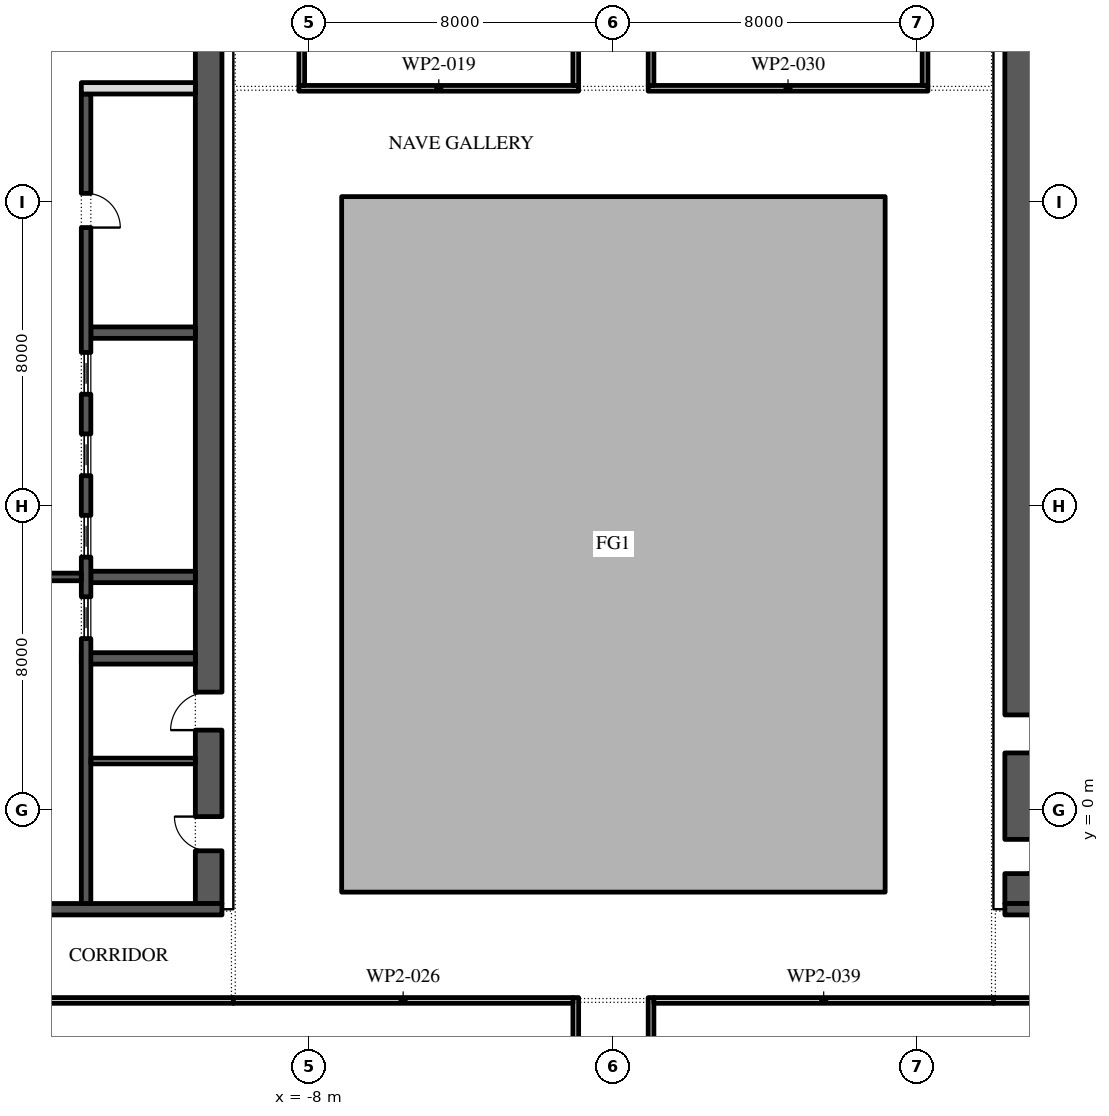
"""IFC4 building model, lengths in metres.
Left out: names, types, materials, properties, quantities, classifications, styles, units other than length and angle.
Written with IfcOpenShell. Run it as: python <this file> out.ifc"""

import sys

from ifc_helpers import new_model, si_unit, direction, frame, frame_2d, origin, place, context, subcontext, project, spatial, polyline, rectangle, outline, extrude, element, fill, save


model = new_model("IFC4")
c1 = context("Model", 3, precision=1e-05, world=origin(), true_north=direction((0.0, 1.0)))
c2 = subcontext(c1, "Body", "Model", "MODEL_VIEW")
j1 = project(units=[si_unit("LENGTHUNIT", "METRE"), si_unit("PLANEANGLEUNIT", "RADIAN")], contexts=[c1])
p1 = place(None, origin())
s1 = spatial("IfcSite", under=j1, at=p1, CompositionType="ELEMENT")
p2 = place(p1, origin())
s2 = spatial("IfcBuilding", under=s1, at=p2, CompositionType="ELEMENT")
p3 = place(p2, frame((0.0, 0.0, 201.0)))
s3 = spatial("IfcBuildingStorey", under=s2, at=p3, CompositionType="ELEMENT", Elevation=201.0)
p4 = place(p3, origin())
e1 = element("IfcWall", 1, at=p4, inside=s3, PredefinedType="STANDARD", context=c2, shape_type="SweptSolid", body=[
    extrude(outline(polyline([(-7.15, -2.15), (7.15, -2.15), (7.15, 16.15), (-7.15, 16.15), (-7.15, -2.15)]), holes=[polyline([(-7.0, -2.0), (-7.0, 16.0), (7.0, 16.0), (7.0, -2.0), (-7.0, -2.0)])]), origin(), (0.0, 0.0, 1.0), 4.0),
])
p5 = place(p3, frame((-10.65, -2.45, 0.0), z_axis=(0.0, 0.0, 1.0), x_axis=(0.0, 1.0, 0.0)))
e2 = element("IfcWall", 2, at=p5, inside=s3, PredefinedType="SHEAR", context=c2, shape_type="SweptSolid", body=[
    extrude(rectangle(XDim=27.9, YDim=0.7, at=frame_2d((13.95, 0.0))), origin(), (0.0, 0.0, 1.0), 4.0),
])
p6 = place(p5, frame((23.65, 0.0, 0.0)))
e3 = element("IfcOpeningElement", 3, at=p6, cuts=e2, PredefinedType="OPENING", context=c2, shape_type="SweptSolid", body=[
    extrude(rectangle(XDim=2.4, YDim=2.1, at=frame_2d((1.2, 1.05))), frame((0.0, 0.36, 0.0), z_axis=(0.0, -1.0, 0.0), x_axis=(1.0, 0.0, 0.0)), (0.0, 0.0, 1.0), 0.72),
])
p7 = place(p5, frame((1.387, 0.0, 0.0)))
e4 = element("IfcOpeningElement", 4, at=p7, cuts=e2, PredefinedType="OPENING", context=c2, shape_type="SweptSolid", body=[
    extrude(rectangle(XDim=0.9, YDim=2.1, at=frame_2d((0.45, 1.05))), frame((0.0, 0.36, 0.0), z_axis=(0.0, -1.0, 0.0), x_axis=(1.0, 0.0, 0.0)), (0.0, 0.0, 1.0), 0.72),
])
p8 = place(p5, frame((4.562, 0.0, 0.0)))
e5 = element("IfcOpeningElement", 5, at=p8, cuts=e2, PredefinedType="OPENING", context=c2, shape_type="SweptSolid", body=[
    extrude(rectangle(XDim=1.0, YDim=2.1, at=frame_2d((0.5, 1.05))), frame((0.0, 0.36, 0.0), z_axis=(0.0, -1.0, 0.0), x_axis=(1.0, 0.0, 0.0)), (0.0, 0.0, 1.0), 0.72),
])
p9 = place(p3, frame((-21.7, -2.6, 0.0), z_axis=(0.0, 0.0, 1.0), x_axis=(1.0, 0.0, 0.0)))
e6 = element("IfcWall", 6, at=p9, inside=s3, PredefinedType="SHEAR", context=c2, shape_type="SweptSolid", body=[
    extrude(rectangle(XDim=11.4, YDim=0.3, at=frame_2d((5.7, 0.0))), origin(), (0.0, 0.0, 1.0), 4.0),
])
p10 = place(p3, frame((-14.0, 4.0, 0.0), z_axis=(0.0, 0.0, 1.0), x_axis=(1.0, 0.0, 0.0)))
e7 = element("IfcWall", 7, at=p10, inside=s3, PredefinedType="SHEAR", context=c2, shape_type="SweptSolid", body=[
    extrude(rectangle(XDim=3.0, YDim=0.3, at=frame_2d((1.5, 0.0))), origin(), (0.0, 0.0, 1.0), 4.0),
])
for number, where, z_axis, x_axis in (
    (8, (-13.75, 6.143, 0.0), (0.0, 0.0, 1.0), (1.0, 0.0, 0.0)),
    (9, (-13.75, 12.571, 0.0), (0.0, 0.0, 1.0), (1.0, 0.0, 0.0)),
):
    element("IfcWall", number, at=place(p3, frame(where, z_axis=z_axis, x_axis=x_axis)), inside=s3, PredefinedType="SHEAR", context=c2, shape_type="SweptSolid", body=[
        extrude(rectangle(XDim=2.75, YDim=0.3, at=frame_2d((1.375, 0.0))), origin(), (0.0, 0.0, 1.0), 4.0),
    ])
p11 = place(p3, frame((-13.875, -2.45, 0.0), z_axis=(0.0, 0.0, 1.0), x_axis=(0.0, 1.0, 0.0)))
e10 = element("IfcWall", 10, at=p11, inside=s3, PredefinedType="SHEAR", context=c2, shape_type="SweptSolid", body=[
    extrude(rectangle(XDim=21.3, YDim=0.25, at=frame_2d((10.65, 0.0))), origin(), (0.0, 0.0, 1.0), 4.0),
])
p12 = place(p11, frame((17.786, 0.0, 0.0)))
e11 = element("IfcOpeningElement", 11, at=p12, cuts=e10, PredefinedType="OPENING", context=c2, shape_type="SweptSolid", body=[
    extrude(rectangle(XDim=0.9, YDim=2.1, at=frame_2d((0.45, 1.05))), frame((0.0, 0.135, 0.0), z_axis=(0.0, -1.0, 0.0), x_axis=(1.0, 0.0, 0.0)), (0.0, 0.0, 1.0), 0.27),
])
p13 = place(p11, frame((6.971, 0.0, 0.0)))
e12 = element("IfcOpeningElement", 12, at=p13, cuts=e10, PredefinedType="OPENING", context=c2, shape_type="SweptSolid", body=[
    extrude(rectangle(XDim=1.1, YDim=2.1, at=frame_2d((0.55, 1.05))), frame((0.0, 0.135, 0.0), z_axis=(0.0, -1.0, 0.0), x_axis=(1.0, 0.0, 0.0)), (0.0, 0.0, 1.0), 0.27),
])
p14 = place(p11, frame((9.114, 0.0, 0.0)))
e13 = element("IfcOpeningElement", 13, at=p14, cuts=e10, PredefinedType="OPENING", context=c2, shape_type="SweptSolid", body=[
    extrude(rectangle(XDim=1.1, YDim=2.1, at=frame_2d((0.55, 1.05))), frame((0.0, 0.135, 0.0), z_axis=(0.0, -1.0, 0.0), x_axis=(1.0, 0.0, 0.0)), (0.0, 0.0, 1.0), 0.27),
])
p15 = place(p11, frame((11.257, 0.0, 0.0)))
e14 = element("IfcOpeningElement", 14, at=p15, cuts=e10, PredefinedType="OPENING", context=c2, shape_type="SweptSolid", body=[
    extrude(rectangle(XDim=1.1, YDim=2.1, at=frame_2d((0.55, 1.05))), frame((0.0, 0.135, 0.0), z_axis=(0.0, -1.0, 0.0), x_axis=(1.0, 0.0, 0.0)), (0.0, 0.0, 1.0), 0.27),
])
p16 = place(p11, frame((13.4, 0.0, 0.0)))
e15 = element("IfcOpeningElement", 15, at=p16, cuts=e10, PredefinedType="OPENING", context=c2, shape_type="SweptSolid", body=[
    extrude(rectangle(XDim=1.1, YDim=2.1, at=frame_2d((0.55, 1.05))), frame((0.0, 0.135, 0.0), z_axis=(0.0, -1.0, 0.0), x_axis=(1.0, 0.0, 0.0)), (0.0, 0.0, 1.0), 0.27),
])
p17 = place(p3, frame((-14.0, 19.0, 0.0), z_axis=(0.0, 0.0, 1.0), x_axis=(1.0, 0.0, 0.0)))
e16 = element("IfcWall", 16, at=p17, inside=s3, PredefinedType="PARTITIONING", context=c2, shape_type="SweptSolid", body=[
    extrude(rectangle(XDim=3.0, YDim=0.3, at=frame_2d((1.5, 0.0))), origin(), (0.0, 0.0, 1.0), 4.0),
])
p18 = place(p3, frame((-18.0, 6.143, 0.0), z_axis=(0.0, 0.0, 1.0), x_axis=(1.0, 0.0, 0.0)))
e17 = element("IfcWall", 17, at=p18, inside=s3, PredefinedType="SHEAR", context=c2, shape_type="SweptSolid", body=[
    extrude(rectangle(XDim=4.0, YDim=0.2, at=frame_2d((2.0, 0.0))), origin(), (0.0, 0.0, 1.0), 4.0),
])
p19 = place(p18, frame((1.4, 0.0, 0.0)))
e18 = element("IfcOpeningElement", 18, at=p19, cuts=e17, PredefinedType="OPENING", context=c2, shape_type="SweptSolid", body=[
    extrude(rectangle(XDim=1.2, YDim=2.1, at=frame_2d((0.6, 1.05))), frame((0.0, 0.11, 0.0), z_axis=(0.0, -1.0, 0.0), x_axis=(1.0, 0.0, 0.0)), (0.0, 0.0, 1.0), 0.22),
])
p20 = place(p3, frame((-13.75, 1.3, 0.0), z_axis=(0.0, 0.0, 1.0), x_axis=(1.0, 0.0, 0.0)))
e19 = element("IfcWall", 19, at=p20, inside=s3, PredefinedType="PARTITIONING", context=c2, shape_type="SweptSolid", body=[
    extrude(rectangle(XDim=2.75, YDim=0.15, at=frame_2d((1.375, 0.0))), origin(), (0.0, 0.0, 1.0), 4.0),
])
p21 = place(p3, frame((10.65, -2.45, 0.0), z_axis=(0.0, 0.0, 1.0), x_axis=(0.0, 1.0, 0.0)))
e20 = element("IfcWall", 20, at=p21, inside=s3, PredefinedType="SHEAR", context=c2, shape_type="SweptSolid", body=[
    extrude(rectangle(XDim=27.9, YDim=0.7, at=frame_2d((13.95, 0.0))), origin(), (0.0, 0.0, 1.0), 4.0),
])
p22 = place(p21, frame((23.65, 0.0, 0.0)))
e21 = element("IfcOpeningElement", 21, at=p22, cuts=e20, PredefinedType="OPENING", context=c2, shape_type="SweptSolid", body=[
    extrude(rectangle(XDim=2.4, YDim=2.1, at=frame_2d((1.2, 1.05))), frame((0.0, 0.36, 0.0), z_axis=(0.0, -1.0, 0.0), x_axis=(1.0, 0.0, 0.0)), (0.0, 0.0, 1.0), 0.72),
])
p23 = place(p21, frame((0.788, 0.0, 0.0)))
e22 = element("IfcOpeningElement", 22, at=p23, cuts=e20, PredefinedType="OPENING", context=c2, shape_type="SweptSolid", body=[
    extrude(rectangle(XDim=0.9, YDim=2.1, at=frame_2d((0.45, 1.05))), frame((0.0, 0.36, 0.0), z_axis=(0.0, -1.0, 0.0), x_axis=(1.0, 0.0, 0.0)), (0.0, 0.0, 1.0), 0.72),
])
p24 = place(p21, frame((3.962, 0.0, 0.0)))
e23 = element("IfcOpeningElement", 23, at=p24, cuts=e20, PredefinedType="OPENING", context=c2, shape_type="SweptSolid", body=[
    extrude(rectangle(XDim=1.0, YDim=2.1, at=frame_2d((0.5, 1.05))), frame((0.0, 0.36, 0.0), z_axis=(0.0, -1.0, 0.0), x_axis=(1.0, 0.0, 0.0)), (0.0, 0.0, 1.0), 0.72),
])
p25 = place(p3, frame((10.3, -2.6, 0.0), z_axis=(0.0, 0.0, 1.0), x_axis=(1.0, 0.0, 0.0)))
e24 = element("IfcWall", 24, at=p25, inside=s3, PredefinedType="SHEAR", context=c2, shape_type="SweptSolid", body=[
    extrude(rectangle(XDim=11.4, YDim=0.3, at=frame_2d((5.7, 0.0))), origin(), (0.0, 0.0, 1.0), 4.0),
])
p26 = place(p3, frame((-10.0, -5.0, 0.0), z_axis=(0.0, 0.0, 1.0), x_axis=(-1.0, 0.0, 0.0)))
e25 = element("IfcWall", 25, at=p26, inside=s3, PredefinedType="PARTITIONING", context=c2, shape_type="SweptSolid", body=[
    extrude(rectangle(XDim=12.47, YDim=0.15, at=frame_2d((6.235, 0.0))), origin(), (0.0, 0.0, 1.0), 4.0),
])
p27 = place(p26, frame((8.37, 0.0, 0.0)))
e26 = element("IfcOpeningElement", 26, at=p27, cuts=e25, PredefinedType="OPENING", context=c2, shape_type="SweptSolid", body=[
    extrude(rectangle(XDim=1.0, YDim=2.1, at=frame_2d((0.5, 1.05))), frame((0.0, 0.085, 0.0), z_axis=(0.0, -1.0, 0.0), x_axis=(1.0, 0.0, 0.0)), (0.0, 0.0, 1.0), 0.17),
])
p28 = place(p3, frame((-8.275, 19.0, 0.0), z_axis=(0.0, 0.0, 1.0), x_axis=(1.0, 0.0, 0.0)))
e27 = element("IfcWall", 27, at=p28, inside=s3, PredefinedType="PARTITIONING", context=c2, shape_type="SweptSolid", body=[
    extrude(rectangle(XDim=7.36, YDim=0.15, at=frame_2d((3.68, 0.0))), origin(), (0.0, 0.0, 1.0), 4.0),
])
p29 = place(p3, frame((-8.2, 27.2, 0.0), z_axis=(0.0, 0.0, 1.0), x_axis=(0.0, -1.0, 0.0)))
e28 = element("IfcWall", 28, at=p29, inside=s3, PredefinedType="PARTITIONING", context=c2, shape_type="SweptSolid", body=[
    extrude(rectangle(XDim=8.125, YDim=0.15, at=frame_2d((4.062, 0.0))), origin(), (0.0, 0.0, 1.0), 4.0),
])
p30 = place(p3, frame((-0.99, -10.45, 0.0), z_axis=(0.0, 0.0, 1.0), x_axis=(0.0, 1.0, 0.0)))
e29 = element("IfcWall", 29, at=p30, inside=s3, PredefinedType="PARTITIONING", context=c2, shape_type="SweptSolid", body=[
    extrude(rectangle(XDim=5.525, YDim=0.15, at=frame_2d((2.762, 0.0))), origin(), (0.0, 0.0, 1.0), 4.0),
])
p31 = place(p3, frame((-1.065, -5.0, 0.0), z_axis=(0.0, 0.0, 1.0), x_axis=(-1.0, 0.0, 0.0)))
e30 = element("IfcWall", 30, at=p31, inside=s3, PredefinedType="PARTITIONING", context=c2, shape_type="SweptSolid", body=[
    extrude(rectangle(XDim=8.935, YDim=0.15, at=frame_2d((4.468, 0.0))), origin(), (0.0, 0.0, 1.0), 4.0),
])
p32 = place(p3, frame((-0.99, 19.075, 0.0), z_axis=(0.0, 0.0, 1.0), x_axis=(0.0, 1.0, 0.0)))
e31 = element("IfcWall", 31, at=p32, inside=s3, PredefinedType="PARTITIONING", context=c2, shape_type="SweptSolid", body=[
    extrude(rectangle(XDim=10.375, YDim=0.15, at=frame_2d((5.188, 0.0))), origin(), (0.0, 0.0, 1.0), 4.0),
])
p33 = place(p32, frame((6.775, 0.0, 0.0)))
e32 = element("IfcOpeningElement", 32, at=p33, cuts=e31, PredefinedType="OPENING", context=c2, shape_type="SweptSolid", body=[
    extrude(rectangle(XDim=1.0, YDim=2.1, at=frame_2d((0.5, 1.05))), frame((0.0, 0.085, 0.0), z_axis=(0.0, -1.0, 0.0), x_axis=(1.0, 0.0, 0.0)), (0.0, 0.0, 1.0), 0.17),
])
p34 = place(p3, frame((0.99, -4.925, 0.0), z_axis=(0.0, 0.0, 1.0), x_axis=(0.0, -1.0, 0.0)))
e33 = element("IfcWall", 33, at=p34, inside=s3, PredefinedType="PARTITIONING", context=c2, shape_type="SweptSolid", body=[
    extrude(rectangle(XDim=11.371, YDim=0.15, at=frame_2d((5.686, 0.0))), origin(), (0.0, 0.0, 1.0), 4.0),
])
p35 = place(p34, frame((2.945, 0.0, 0.0)))
e34 = element("IfcOpeningElement", 34, at=p35, cuts=e33, PredefinedType="OPENING", context=c2, shape_type="SweptSolid", body=[
    extrude(rectangle(XDim=1.0, YDim=2.1, at=frame_2d((0.5, 1.05))), frame((0.0, 0.085, 0.0), z_axis=(0.0, -1.0, 0.0), x_axis=(1.0, 0.0, 0.0)), (0.0, 0.0, 1.0), 0.17),
])
p36 = place(p3, frame((0.915, 19.0, 0.0), z_axis=(0.0, 0.0, 1.0), x_axis=(1.0, 0.0, 0.0)))
e35 = element("IfcWall", 35, at=p36, inside=s3, PredefinedType="PARTITIONING", context=c2, shape_type="SweptSolid", body=[
    extrude(rectangle(XDim=7.36, YDim=0.15, at=frame_2d((3.68, 0.0))), origin(), (0.0, 0.0, 1.0), 4.0),
])
p37 = place(p3, frame((0.99, 29.24, 0.0), z_axis=(0.0, 0.0, 1.0), x_axis=(0.0, -1.0, 0.0)))
e36 = element("IfcWall", 36, at=p37, inside=s3, PredefinedType="PARTITIONING", context=c2, shape_type="SweptSolid", body=[
    extrude(rectangle(XDim=10.165, YDim=0.15, at=frame_2d((5.083, 0.0))), origin(), (0.0, 0.0, 1.0), 4.0),
])
p38 = place(p37, frame((3.59, 0.0, 0.0)))
e37 = element("IfcOpeningElement", 37, at=p38, cuts=e36, PredefinedType="OPENING", context=c2, shape_type="SweptSolid", body=[
    extrude(rectangle(XDim=1.0, YDim=2.1, at=frame_2d((0.5, 1.05))), frame((0.0, 0.085, 0.0), z_axis=(0.0, -1.0, 0.0), x_axis=(1.0, 0.0, 0.0)), (0.0, 0.0, 1.0), 0.17),
])
p39 = place(p3, frame((8.2, 19.075, 0.0), z_axis=(0.0, 0.0, 1.0), x_axis=(0.0, 1.0, 0.0)))
e38 = element("IfcWall", 38, at=p39, inside=s3, PredefinedType="PARTITIONING", context=c2, shape_type="SweptSolid", body=[
    extrude(rectangle(XDim=8.125, YDim=0.15, at=frame_2d((4.062, 0.0))), origin(), (0.0, 0.0, 1.0), 4.0),
])
p40 = place(p3, frame((10.0, -5.0, 0.0), z_axis=(0.0, 0.0, 1.0), x_axis=(-1.0, 0.0, 0.0)))
e39 = element("IfcWall", 39, at=p40, inside=s3, PredefinedType="PARTITIONING", context=c2, shape_type="SweptSolid", body=[
    extrude(rectangle(XDim=8.935, YDim=0.15, at=frame_2d((4.468, 0.0))), origin(), (0.0, 0.0, 1.0), 4.0),
])
p41 = place(p3, frame((17.97, -5.0, 0.0), z_axis=(0.0, 0.0, 1.0), x_axis=(-1.0, 0.0, 0.0)))
e40 = element("IfcWall", 40, at=p41, inside=s3, PredefinedType="PARTITIONING", context=c2, shape_type="SweptSolid", body=[
    extrude(rectangle(XDim=7.97, YDim=0.15, at=frame_2d((3.985, 0.0))), origin(), (0.0, 0.0, 1.0), 4.0),
])
p42 = place(p12, frame((0.9, -0.2, 0.0), z_axis=(0.0, 0.0, 1.0), x_axis=(-1.0, 0.0, 0.0)))
e41 = element("IfcDoor", 41, at=p42, inside=s3, OperationType="SINGLE_SWING_LEFT", PredefinedType="DOOR", context=c2, shape_type="SweptSolid", body=[
    extrude(rectangle(XDim=0.9, YDim=2.1, at=frame_2d((0.45, 1.05))), frame((0.0, -0.075, 0.0), z_axis=(0.0, -1.0, 0.0), x_axis=(1.0, 0.0, 0.0)), (0.0, 0.0, 1.0), 0.05),
])
fill(e11, e41)
p43 = place(p13, origin())
e42 = element("IfcDoor", 42, at=p43, inside=s3, OperationType="SLIDING_TO_LEFT", PredefinedType="DOOR", context=c2, shape_type="SweptSolid", body=[
    extrude(rectangle(XDim=1.1, YDim=2.1, at=frame_2d((0.55, 1.05))), frame((0.0, 0.025, 0.0), z_axis=(0.0, -1.0, 0.0), x_axis=(1.0, 0.0, 0.0)), (0.0, 0.0, 1.0), 0.05),
])
fill(e12, e42)
p44 = place(p14, origin())
e43 = element("IfcDoor", 43, at=p44, inside=s3, OperationType="SLIDING_TO_LEFT", PredefinedType="DOOR", context=c2, shape_type="SweptSolid", body=[
    extrude(rectangle(XDim=1.1, YDim=2.1, at=frame_2d((0.55, 1.05))), frame((0.0, 0.025, 0.0), z_axis=(0.0, -1.0, 0.0), x_axis=(1.0, 0.0, 0.0)), (0.0, 0.0, 1.0), 0.05),
])
fill(e13, e43)
p45 = place(p15, origin())
e44 = element("IfcDoor", 44, at=p45, inside=s3, OperationType="SLIDING_TO_LEFT", PredefinedType="DOOR", context=c2, shape_type="SweptSolid", body=[
    extrude(rectangle(XDim=1.1, YDim=2.1, at=frame_2d((0.55, 1.05))), frame((0.0, 0.025, 0.0), z_axis=(0.0, -1.0, 0.0), x_axis=(1.0, 0.0, 0.0)), (0.0, 0.0, 1.0), 0.05),
])
fill(e14, e44)
p46 = place(p16, origin())
e45 = element("IfcDoor", 45, at=p46, inside=s3, OperationType="SLIDING_TO_LEFT", PredefinedType="DOOR", context=c2, shape_type="SweptSolid", body=[
    extrude(rectangle(XDim=1.1, YDim=2.1, at=frame_2d((0.55, 1.05))), frame((0.0, 0.025, 0.0), z_axis=(0.0, -1.0, 0.0), x_axis=(1.0, 0.0, 0.0)), (0.0, 0.0, 1.0), 0.05),
])
fill(e15, e45)
p47 = place(p7, origin())
e46 = element("IfcDoor", 46, at=p47, inside=s3, OperationType="SINGLE_SWING_LEFT", PredefinedType="DOOR", context=c2, shape_type="SweptSolid", body=[
    extrude(rectangle(XDim=0.9, YDim=2.1, at=frame_2d((0.45, 1.05))), frame((0.0, 0.35, 0.0), z_axis=(0.0, -1.0, 0.0), x_axis=(1.0, 0.0, 0.0)), (0.0, 0.0, 1.0), 0.05),
])
fill(e4, e46)
p48 = place(p8, origin())
e47 = element("IfcDoor", 47, at=p48, inside=s3, OperationType="SINGLE_SWING_RIGHT", PredefinedType="DOOR", context=c2, shape_type="SweptSolid", body=[
    extrude(rectangle(XDim=1.0, YDim=2.1, at=frame_2d((0.5, 1.05))), frame((0.0, 0.35, 0.0), z_axis=(0.0, -1.0, 0.0), x_axis=(1.0, 0.0, 0.0)), (0.0, 0.0, 1.0), 0.05),
])
fill(e5, e47)
save(model, sys.argv[1])
